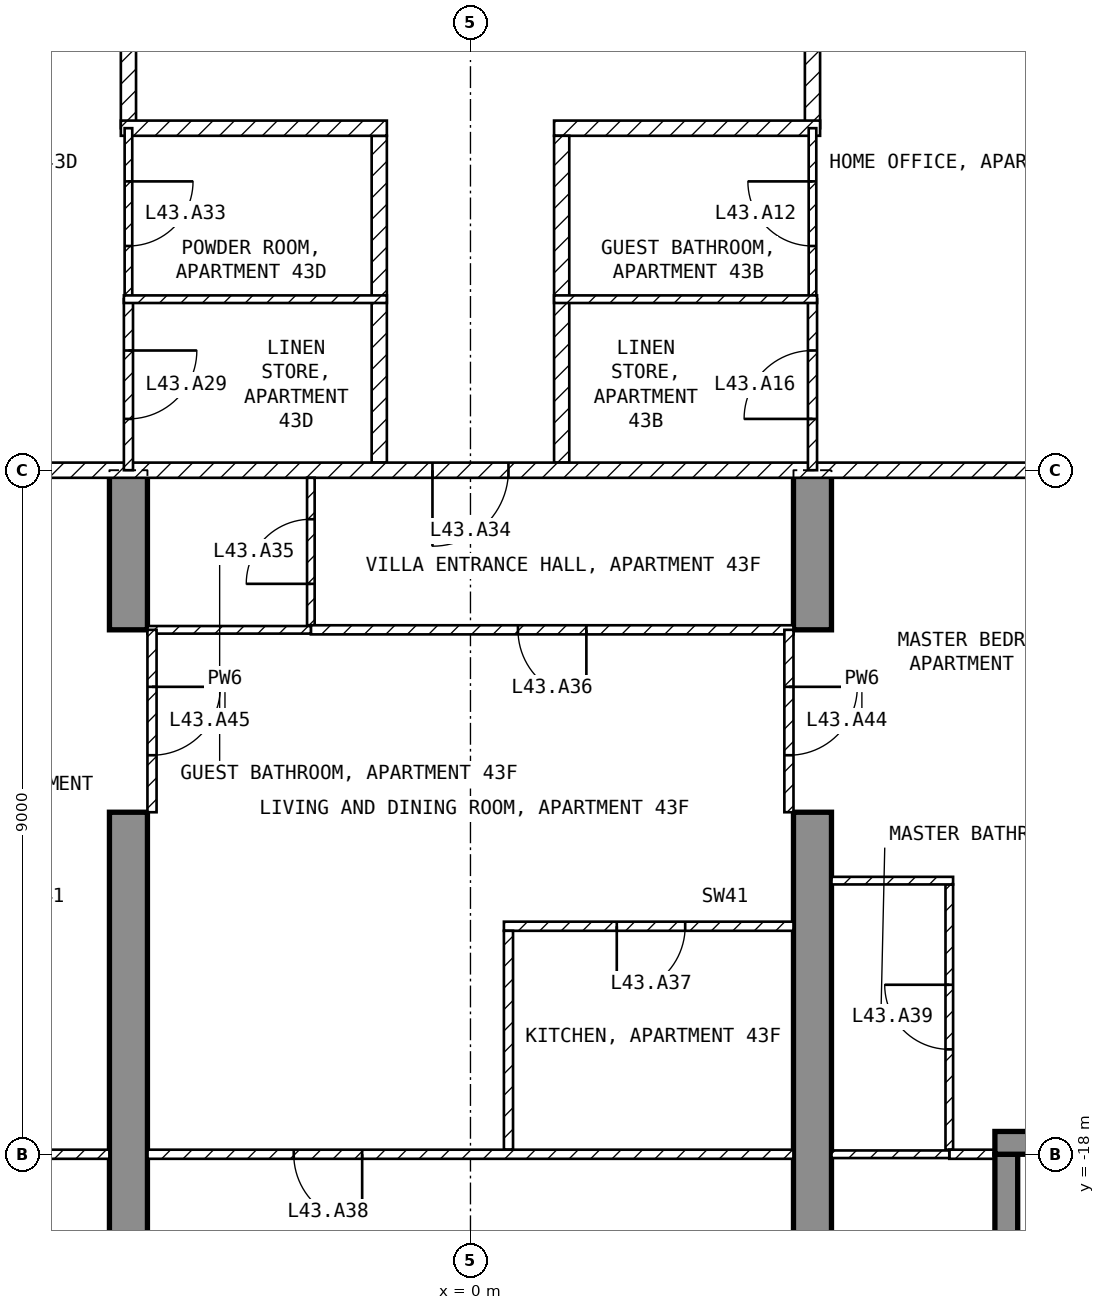
"""IFC4 building model, lengths in metres.
Left out: names, types, materials, properties, quantities, classifications, styles, units other than length and angle.
Written with IfcOpenShell. Run it as: python <this file> out.ifc"""

import sys

from ifc_helpers import new_model, si_unit, direction, frame, frame_2d, origin, place, context, subcontext, project, spatial, polyline, rectangle, outline, extrude, element, fill, save


model = new_model("IFC4")
c1 = context("Model", 3, precision=1e-05, world=origin(), true_north=direction((0.0, 1.0)))
c2 = subcontext(c1, "Body", "Model", "MODEL_VIEW")
j1 = project(units=[si_unit("LENGTHUNIT", "METRE"), si_unit("PLANEANGLEUNIT", "RADIAN")], contexts=[c1])
p1 = place(None, origin())
s1 = spatial("IfcSite", under=j1, at=p1, CompositionType="ELEMENT")
p2 = place(p1, origin())
s2 = spatial("IfcBuilding", under=s1, at=p2, CompositionType="ELEMENT")
p3 = place(p2, frame((0.0, 0.0, 177.1)))
s3 = spatial("IfcBuildingStorey", under=s2, at=p3, CompositionType="ELEMENT", Elevation=177.1)
for number, where, z_axis, x_axis in (
    (1, (-4.75, -20.225, -0.25), (1.0, 0.0, 0.0), (0.0, 1.0, 0.0)),
    (2, (4.25, -20.225, -0.25), (1.0, 0.0, 0.0), (0.0, 1.0, 0.0)),
):
    element("IfcWall", number, at=place(p3, frame(where, z_axis=z_axis, x_axis=x_axis)), inside=s3, PredefinedType="SHEAR", context=c2, shape_type="SweptSolid", body=[
        extrude(outline(polyline([(0.0, 0.0), (6.725, 0.0), (6.725, 2.65), (9.125, 2.65), (9.125, 0.0), (11.225, 0.0), (11.225, 3.5), (0.0, 3.5), (0.0, 0.0)])), origin(), (0.0, 0.0, 1.0), 0.5),
    ])
p4 = place(p3, frame((7.05, -19.8, 0.0), z_axis=(0.0, 0.0, 1.0), x_axis=(0.0, 1.0, 0.0)))
e3 = element("IfcWall", 3, at=p4, inside=s3, PredefinedType="SOLIDWALL", context=c2, shape_type="SweptSolid", body=[
    extrude(rectangle(XDim=1.8, YDim=0.3, at=frame_2d((0.9, 0.0))), origin(), (0.0, 0.0, 1.0), 3.25),
])
p5 = place(p3, frame((6.9, -17.85, 0.0), z_axis=(0.0, 0.0, 1.0), x_axis=(1.0, 0.0, 0.0)))
e4 = element("IfcWall", 4, at=p5, inside=s3, PredefinedType="SOLIDWALL", context=c2, shape_type="SweptSolid", body=[
    extrude(rectangle(XDim=1.85, YDim=0.3, at=frame_2d((0.925, 0.0))), origin(), (0.0, 0.0, 1.0), 3.25),
])
p6 = place(p3, frame((4.5, -1.3, 0.0), z_axis=(0.0, 0.0, 1.0), x_axis=(0.0, -1.0, 0.0)))
e5 = element("IfcWall", 5, at=p6, inside=s3, PredefinedType="PARTITIONING", context=c2, shape_type="SweptSolid", body=[
    extrude(rectangle(XDim=3.2, YDim=0.2, at=frame_2d((1.6, 0.0))), origin(), (0.0, 0.0, 1.0), 3.25),
])
p7 = place(p3, frame((4.6, -4.5, 0.0), z_axis=(0.0, 0.0, 1.0), x_axis=(-1.0, 0.0, 0.0)))
e6 = element("IfcWall", 6, at=p7, inside=s3, PredefinedType="PARTITIONING", context=c2, shape_type="SweptSolid", body=[
    extrude(rectangle(XDim=3.5, YDim=0.2, at=frame_2d((1.75, 0.0))), origin(), (0.0, 0.0, 1.0), 3.25),
])
p8 = place(p3, frame((1.2, -4.6, 0.0), z_axis=(0.0, 0.0, 1.0), x_axis=(0.0, -1.0, 0.0)))
e7 = element("IfcWall", 7, at=p8, inside=s3, PredefinedType="PARTITIONING", context=c2, shape_type="SweptSolid", body=[
    extrude(rectangle(XDim=4.3, YDim=0.2, at=frame_2d((2.15, 0.0))), origin(), (0.0, 0.0, 1.0), 3.25),
])
p9 = place(p3, frame((-4.5, -4.5, 0.0), z_axis=(0.0, 0.0, 1.0), x_axis=(0.0, 1.0, 0.0)))
e8 = element("IfcWall", 8, at=p9, inside=s3, PredefinedType="PARTITIONING", context=c2, shape_type="SweptSolid", body=[
    extrude(rectangle(XDim=3.2, YDim=0.2, at=frame_2d((1.6, 0.0))), origin(), (0.0, 0.0, 1.0), 3.25),
])
p10 = place(p3, frame((-1.2, -8.9, 0.0), z_axis=(0.0, 0.0, 1.0), x_axis=(0.0, 1.0, 0.0)))
e9 = element("IfcWall", 9, at=p10, inside=s3, PredefinedType="PARTITIONING", context=c2, shape_type="SweptSolid", body=[
    extrude(rectangle(XDim=4.3, YDim=0.2, at=frame_2d((2.15, 0.0))), origin(), (0.0, 0.0, 1.0), 3.25),
])
p11 = place(p3, frame((-1.1, -4.5, 0.0), z_axis=(0.0, 0.0, 1.0), x_axis=(-1.0, 0.0, 0.0)))
e10 = element("IfcWall", 10, at=p11, inside=s3, PredefinedType="PARTITIONING", context=c2, shape_type="SweptSolid", body=[
    extrude(rectangle(XDim=3.5, YDim=0.2, at=frame_2d((1.75, 0.0))), origin(), (0.0, 0.0, 1.0), 3.25),
])
p12 = place(p3, frame((8.92, -9.0, 0.0), z_axis=(0.0, 0.0, 1.0), x_axis=(-1.0, 0.0, 0.0)))
e11 = element("IfcWall", 11, at=p12, inside=s3, PredefinedType="PARTITIONING", context=c2, shape_type="SweptSolid", body=[
    extrude(rectangle(XDim=17.84, YDim=0.2, at=frame_2d((8.92, 0.0))), origin(), (0.0, 0.0, 1.0), 3.25),
])
p13 = place(p12, frame((8.42, 0.0, 0.0)))
e12 = element("IfcOpeningElement", 12, at=p13, cuts=e11, PredefinedType="OPENING", context=c2, shape_type="SweptSolid", body=[
    extrude(rectangle(XDim=1.0, YDim=2.1, at=frame_2d((0.5, 1.05))), frame((0.0, 0.11, 0.0), z_axis=(0.0, -1.0, 0.0), x_axis=(1.0, 0.0, 0.0)), (0.0, 0.0, 1.0), 0.22),
])
p14 = place(p3, frame((4.5, -6.75, 0.0), z_axis=(0.0, 0.0, 1.0), x_axis=(0.0, 1.0, 0.0)))
e13 = element("IfcWall", 13, at=p14, inside=s3, PredefinedType="PARTITIONING", context=c2, shape_type="SweptSolid", body=[
    extrude(rectangle(XDim=2.25, YDim=0.1, at=frame_2d((1.125, 0.0))), origin(), (0.0, 0.0, 1.0), 3.25),
])
p15 = place(p14, frame((0.7, 0.0, 0.0)))
e14 = element("IfcOpeningElement", 14, at=p15, cuts=e13, PredefinedType="OPENING", context=c2, shape_type="SweptSolid", body=[
    extrude(rectangle(XDim=0.85, YDim=2.1, at=frame_2d((0.425, 1.05))), frame((0.0, 0.06, 0.0), z_axis=(0.0, -1.0, 0.0), x_axis=(1.0, 0.0, 0.0)), (0.0, 0.0, 1.0), 0.12),
])
p16 = place(p3, frame((4.5, -9.0, 0.0), z_axis=(0.0, 0.0, 1.0), x_axis=(0.0, 1.0, 0.0)))
e15 = element("IfcWall", 15, at=p16, inside=s3, PredefinedType="PARTITIONING", context=c2, shape_type="SweptSolid", body=[
    extrude(rectangle(XDim=2.25, YDim=0.12, at=frame_2d((1.125, 0.0))), origin(), (0.0, 0.0, 1.0), 3.25),
])
p17 = place(p16, frame((0.675, 0.0, 0.0)))
e16 = element("IfcOpeningElement", 16, at=p17, cuts=e15, PredefinedType="OPENING", context=c2, shape_type="SweptSolid", body=[
    extrude(rectangle(XDim=0.9, YDim=2.1, at=frame_2d((0.45, 1.05))), frame((0.0, 0.07, 0.0), z_axis=(0.0, -1.0, 0.0), x_axis=(1.0, 0.0, 0.0)), (0.0, 0.0, 1.0), 0.14),
])
p18 = place(p3, frame((4.56, -6.75, 0.0), z_axis=(0.0, 0.0, 1.0), x_axis=(-1.0, 0.0, 0.0)))
e17 = element("IfcWall", 17, at=p18, inside=s3, PredefinedType="PARTITIONING", context=c2, shape_type="SweptSolid", body=[
    extrude(rectangle(XDim=3.46, YDim=0.1, at=frame_2d((1.73, 0.0))), origin(), (0.0, 0.0, 1.0), 3.25),
])
p19 = place(p3, frame((-4.5, -4.5, 0.0), z_axis=(0.0, 0.0, 1.0), x_axis=(0.0, -1.0, 0.0)))
e18 = element("IfcWall", 18, at=p19, inside=s3, PredefinedType="PARTITIONING", context=c2, shape_type="SweptSolid", body=[
    extrude(rectangle(XDim=2.25, YDim=0.1, at=frame_2d((1.125, 0.0))), origin(), (0.0, 0.0, 1.0), 3.25),
])
p20 = place(p19, frame((0.7, 0.0, 0.0)))
e19 = element("IfcOpeningElement", 19, at=p20, cuts=e18, PredefinedType="OPENING", context=c2, shape_type="SweptSolid", body=[
    extrude(rectangle(XDim=0.85, YDim=2.1, at=frame_2d((0.425, 1.05))), frame((0.0, 0.06, 0.0), z_axis=(0.0, -1.0, 0.0), x_axis=(1.0, 0.0, 0.0)), (0.0, 0.0, 1.0), 0.12),
])
p21 = place(p3, frame((-4.5, -6.75, 0.0), z_axis=(0.0, 0.0, 1.0), x_axis=(0.0, -1.0, 0.0)))
e20 = element("IfcWall", 20, at=p21, inside=s3, PredefinedType="PARTITIONING", context=c2, shape_type="SweptSolid", body=[
    extrude(rectangle(XDim=2.25, YDim=0.12, at=frame_2d((1.125, 0.0))), origin(), (0.0, 0.0, 1.0), 3.25),
])
p22 = place(p21, frame((0.675, 0.0, 0.0)))
e21 = element("IfcOpeningElement", 21, at=p22, cuts=e20, PredefinedType="OPENING", context=c2, shape_type="SweptSolid", body=[
    extrude(rectangle(XDim=0.9, YDim=2.1, at=frame_2d((0.45, 1.05))), frame((0.0, 0.07, 0.0), z_axis=(0.0, -1.0, 0.0), x_axis=(1.0, 0.0, 0.0)), (0.0, 0.0, 1.0), 0.14),
])
p23 = place(p3, frame((-1.1, -6.75, 0.0), z_axis=(0.0, 0.0, 1.0), x_axis=(-1.0, 0.0, 0.0)))
e22 = element("IfcWall", 22, at=p23, inside=s3, PredefinedType="PARTITIONING", context=c2, shape_type="SweptSolid", body=[
    extrude(rectangle(XDim=3.46, YDim=0.1, at=frame_2d((1.73, 0.0))), origin(), (0.0, 0.0, 1.0), 3.25),
])
p24 = place(p3, frame((-2.1, -11.04, 0.0), z_axis=(0.0, 0.0, 1.0), x_axis=(0.0, 1.0, 0.0)))
e23 = element("IfcWall", 23, at=p24, inside=s3, PredefinedType="PARTITIONING", context=c2, shape_type="SweptSolid", body=[
    extrude(rectangle(XDim=1.94, YDim=0.1, at=frame_2d((0.97, 0.0))), origin(), (0.0, 0.0, 1.0), 3.25),
])
p25 = place(p24, frame((0.545, 0.0, 0.0)))
e24 = element("IfcOpeningElement", 24, at=p25, cuts=e23, PredefinedType="OPENING", context=c2, shape_type="SweptSolid", body=[
    extrude(rectangle(XDim=0.85, YDim=2.1, at=frame_2d((0.425, 1.05))), frame((0.0, 0.06, 0.0), z_axis=(0.0, -1.0, 0.0), x_axis=(1.0, 0.0, 0.0)), (0.0, 0.0, 1.0), 0.12),
])
p26 = place(p3, frame((4.25, -11.1, 0.0), z_axis=(0.0, 0.0, 1.0), x_axis=(-1.0, 0.0, 0.0)))
e25 = element("IfcWall", 25, at=p26, inside=s3, PredefinedType="PARTITIONING", context=c2, shape_type="SweptSolid", body=[
    extrude(rectangle(XDim=6.35, YDim=0.12, at=frame_2d((3.175, 0.0))), origin(), (0.0, 0.0, 1.0), 3.25),
])
p27 = place(p26, frame((2.725, 0.0, 0.0)))
e26 = element("IfcOpeningElement", 26, at=p27, cuts=e25, PredefinedType="OPENING", context=c2, shape_type="SweptSolid", body=[
    extrude(rectangle(XDim=0.9, YDim=2.1, at=frame_2d((0.45, 1.05))), frame((0.0, 0.07, 0.0), z_axis=(0.0, -1.0, 0.0), x_axis=(1.0, 0.0, 0.0)), (0.0, 0.0, 1.0), 0.14),
])
p28 = place(p3, frame((-2.1, -11.1, 0.0), z_axis=(0.0, 0.0, 1.0), x_axis=(-1.0, 0.0, 0.0)))
e27 = element("IfcWall", 27, at=p28, inside=s3, PredefinedType="PARTITIONING", context=c2, shape_type="SweptSolid", body=[
    extrude(rectangle(XDim=2.15, YDim=0.1, at=frame_2d((1.075, 0.0))), origin(), (0.0, 0.0, 1.0), 3.25),
])
p29 = place(p3, frame((4.25, -15.0, 0.0), z_axis=(0.0, 0.0, 1.0), x_axis=(-1.0, 0.0, 0.0)))
e28 = element("IfcWall", 28, at=p29, inside=s3, PredefinedType="PARTITIONING", context=c2, shape_type="SweptSolid", body=[
    extrude(rectangle(XDim=3.81, YDim=0.12, at=frame_2d((1.905, 0.0))), origin(), (0.0, 0.0, 1.0), 3.25),
])
p30 = place(p29, frame((1.425, 0.0, 0.0)))
e29 = element("IfcOpeningElement", 29, at=p30, cuts=e28, PredefinedType="OPENING", context=c2, shape_type="SweptSolid", body=[
    extrude(rectangle(XDim=0.9, YDim=2.1, at=frame_2d((0.45, 1.05))), frame((0.0, 0.07, 0.0), z_axis=(0.0, -1.0, 0.0), x_axis=(1.0, 0.0, 0.0)), (0.0, 0.0, 1.0), 0.14),
])
p31 = place(p3, frame((0.5, -15.06, 0.0), z_axis=(0.0, 0.0, 1.0), x_axis=(0.0, -1.0, 0.0)))
e30 = element("IfcWall", 30, at=p31, inside=s3, PredefinedType="PARTITIONING", context=c2, shape_type="SweptSolid", body=[
    extrude(rectangle(XDim=2.88, YDim=0.12, at=frame_2d((1.44, 0.0))), origin(), (0.0, 0.0, 1.0), 3.25),
])
p32 = place(p3, frame((4.25, -18.0, 0.0), z_axis=(0.0, 0.0, 1.0), x_axis=(-1.0, 0.0, 0.0)))
e31 = element("IfcWall", 31, at=p32, inside=s3, PredefinedType="PARTITIONING", context=c2, shape_type="SweptSolid", body=[
    extrude(rectangle(XDim=8.5, YDim=0.12, at=frame_2d((4.25, 0.0))), origin(), (0.0, 0.0, 1.0), 3.25),
])
p33 = place(p32, frame((5.675, 0.0, 0.0)))
e32 = element("IfcOpeningElement", 32, at=p33, cuts=e31, PredefinedType="OPENING", context=c2, shape_type="SweptSolid", body=[
    extrude(rectangle(XDim=0.9, YDim=2.1, at=frame_2d((0.45, 1.05))), frame((0.0, 0.07, 0.0), z_axis=(0.0, -1.0, 0.0), x_axis=(1.0, 0.0, 0.0)), (0.0, 0.0, 1.0), 0.14),
])
p34 = place(p3, frame((6.3, -17.94, 0.0), z_axis=(0.0, 0.0, 1.0), x_axis=(0.0, 1.0, 0.0)))
e33 = element("IfcWall", 33, at=p34, inside=s3, PredefinedType="PARTITIONING", context=c2, shape_type="SweptSolid", body=[
    extrude(rectangle(XDim=3.49, YDim=0.1, at=frame_2d((1.745, 0.0))), origin(), (0.0, 0.0, 1.0), 3.25),
])
p35 = place(p34, frame((1.32, 0.0, 0.0)))
e34 = element("IfcOpeningElement", 34, at=p35, cuts=e33, PredefinedType="OPENING", context=c2, shape_type="SweptSolid", body=[
    extrude(rectangle(XDim=0.85, YDim=2.1, at=frame_2d((0.425, 1.05))), frame((0.0, 0.06, 0.0), z_axis=(0.0, -1.0, 0.0), x_axis=(1.0, 0.0, 0.0)), (0.0, 0.0, 1.0), 0.12),
])
p36 = place(p3, frame((6.35, -14.4, 0.0), z_axis=(0.0, 0.0, 1.0), x_axis=(-1.0, 0.0, 0.0)))
e35 = element("IfcWall", 35, at=p36, inside=s3, PredefinedType="PARTITIONING", context=c2, shape_type="SweptSolid", body=[
    extrude(rectangle(XDim=1.6, YDim=0.1, at=frame_2d((0.8, 0.0))), origin(), (0.0, 0.0, 1.0), 3.25),
])
p37 = place(p3, frame((7.12, -18.0, 0.0), z_axis=(0.0, 0.0, 1.0), x_axis=(-1.0, 0.0, 0.0)))
e36 = element("IfcWall", 36, at=p37, inside=s3, PredefinedType="PARTITIONING", context=c2, shape_type="SweptSolid", body=[
    extrude(rectangle(XDim=0.82, YDim=0.12, at=frame_2d((0.41, 0.0))), origin(), (0.0, 0.0, 1.0), 3.25),
])
p38 = place(p3, frame((6.3, -18.0, 0.0), z_axis=(0.0, 0.0, 1.0), x_axis=(-1.0, 0.0, 0.0)))
e37 = element("IfcWall", 37, at=p38, inside=s3, PredefinedType="PARTITIONING", context=c2, shape_type="SweptSolid", body=[
    extrude(rectangle(XDim=1.55, YDim=0.1, at=frame_2d((0.775, 0.0))), origin(), (0.0, 0.0, 1.0), 3.25),
])
p39 = place(p3, frame((-4.75, -18.0, 0.0), z_axis=(0.0, 0.0, 1.0), x_axis=(-1.0, 0.0, 0.0)))
e38 = element("IfcWall", 38, at=p39, inside=s3, PredefinedType="PARTITIONING", context=c2, shape_type="SweptSolid", body=[
    extrude(rectangle(XDim=2.37, YDim=0.12, at=frame_2d((1.185, 0.0))), origin(), (0.0, 0.0, 1.0), 3.25),
])
p40 = place(p3, frame((4.19, -11.1, 0.0), z_axis=(0.0, 0.0, 1.0), x_axis=(0.0, -1.0, 0.0)))
e39 = element("IfcWall", 39, at=p40, inside=s3, PredefinedType="PARTITIONING", context=c2, shape_type="SweptSolid", body=[
    extrude(rectangle(XDim=2.4, YDim=0.12, at=frame_2d((1.2, 0.0))), origin(), (0.0, 0.0, 1.0), 2.4),
])
p41 = place(p40, frame((0.75, 0.0, 0.0)))
e40 = element("IfcOpeningElement", 40, at=p41, cuts=e39, PredefinedType="OPENING", context=c2, shape_type="SweptSolid", body=[
    extrude(rectangle(XDim=0.9, YDim=2.1, at=frame_2d((0.45, 1.05))), frame((0.0, 0.07, 0.0), z_axis=(0.0, -1.0, 0.0), x_axis=(1.0, 0.0, 0.0)), (0.0, 0.0, 1.0), 0.14),
])
p42 = place(p3, frame((-4.19, -11.1, 0.0), z_axis=(0.0, 0.0, 1.0), x_axis=(0.0, -1.0, 0.0)))
e41 = element("IfcWall", 41, at=p42, inside=s3, PredefinedType="PARTITIONING", context=c2, shape_type="SweptSolid", body=[
    extrude(rectangle(XDim=2.4, YDim=0.12, at=frame_2d((1.2, 0.0))), origin(), (0.0, 0.0, 1.0), 2.4),
])
p43 = place(p42, frame((0.75, 0.0, 0.0)))
e42 = element("IfcOpeningElement", 42, at=p43, cuts=e41, PredefinedType="OPENING", context=c2, shape_type="SweptSolid", body=[
    extrude(rectangle(XDim=0.9, YDim=2.1, at=frame_2d((0.45, 1.05))), frame((0.0, 0.07, 0.0), z_axis=(0.0, -1.0, 0.0), x_axis=(1.0, 0.0, 0.0)), (0.0, 0.0, 1.0), 0.14),
])
p44 = place(p15, origin())
e43 = element("IfcDoor", 43, at=p44, inside=s3, OperationType="SINGLE_SWING_RIGHT", PredefinedType="DOOR", context=c2, shape_type="SweptSolid", body=[
    extrude(rectangle(XDim=0.85, YDim=2.1, at=frame_2d((0.425, 1.05))), frame((0.0, 0.025, 0.0), z_axis=(0.0, -1.0, 0.0), x_axis=(1.0, 0.0, 0.0)), (0.0, 0.0, 1.0), 0.05),
])
fill(e14, e43)
p45 = place(p17, origin())
e44 = element("IfcDoor", 44, at=p45, inside=s3, OperationType="SINGLE_SWING_LEFT", PredefinedType="DOOR", context=c2, shape_type="SweptSolid", body=[
    extrude(rectangle(XDim=0.9, YDim=2.1, at=frame_2d((0.45, 1.05))), frame((0.0, 0.025, 0.0), z_axis=(0.0, -1.0, 0.0), x_axis=(1.0, 0.0, 0.0)), (0.0, 0.0, 1.0), 0.05),
])
fill(e16, e44)
p46 = place(p22, origin())
e45 = element("IfcDoor", 45, at=p46, inside=s3, OperationType="SINGLE_SWING_LEFT", PredefinedType="DOOR", context=c2, shape_type="SweptSolid", body=[
    extrude(rectangle(XDim=0.9, YDim=2.1, at=frame_2d((0.45, 1.05))), frame((0.0, 0.025, 0.0), z_axis=(0.0, -1.0, 0.0), x_axis=(1.0, 0.0, 0.0)), (0.0, 0.0, 1.0), 0.05),
])
fill(e21, e45)
p47 = place(p20, origin())
e46 = element("IfcDoor", 46, at=p47, inside=s3, OperationType="SINGLE_SWING_LEFT", PredefinedType="DOOR", context=c2, shape_type="SweptSolid", body=[
    extrude(rectangle(XDim=0.85, YDim=2.1, at=frame_2d((0.425, 1.05))), frame((0.0, 0.025, 0.0), z_axis=(0.0, -1.0, 0.0), x_axis=(1.0, 0.0, 0.0)), (0.0, 0.0, 1.0), 0.05),
])
fill(e19, e46)
p48 = place(p13, origin())
e47 = element("IfcDoor", 47, at=p48, inside=s3, OperationType="SINGLE_SWING_RIGHT", PredefinedType="DOOR", context=c2, shape_type="SweptSolid", body=[
    extrude(rectangle(XDim=1.0, YDim=2.1, at=frame_2d((0.5, 1.05))), frame((0.0, 0.025, 0.0), z_axis=(0.0, -1.0, 0.0), x_axis=(1.0, 0.0, 0.0)), (0.0, 0.0, 1.0), 0.05),
])
fill(e12, e47)
p49 = place(p25, origin())
e48 = element("IfcDoor", 48, at=p49, inside=s3, OperationType="SINGLE_SWING_LEFT", PredefinedType="DOOR", context=c2, shape_type="SweptSolid", body=[
    extrude(rectangle(XDim=0.85, YDim=2.1, at=frame_2d((0.425, 1.05))), frame((0.0, 0.025, 0.0), z_axis=(0.0, -1.0, 0.0), x_axis=(1.0, 0.0, 0.0)), (0.0, 0.0, 1.0), 0.05),
])
fill(e24, e48)
p50 = place(p27, origin())
e49 = element("IfcDoor", 49, at=p50, inside=s3, OperationType="SINGLE_SWING_LEFT", PredefinedType="DOOR", context=c2, shape_type="SweptSolid", body=[
    extrude(rectangle(XDim=0.9, YDim=2.1, at=frame_2d((0.45, 1.05))), frame((0.0, 0.025, 0.0), z_axis=(0.0, -1.0, 0.0), x_axis=(1.0, 0.0, 0.0)), (0.0, 0.0, 1.0), 0.05),
])
fill(e26, e49)
p51 = place(p30, origin())
e50 = element("IfcDoor", 50, at=p51, inside=s3, OperationType="SINGLE_SWING_RIGHT", PredefinedType="DOOR", context=c2, shape_type="SweptSolid", body=[
    extrude(rectangle(XDim=0.9, YDim=2.1, at=frame_2d((0.45, 1.05))), frame((0.0, 0.025, 0.0), z_axis=(0.0, -1.0, 0.0), x_axis=(1.0, 0.0, 0.0)), (0.0, 0.0, 1.0), 0.05),
])
fill(e29, e50)
p52 = place(p33, origin())
e51 = element("IfcDoor", 51, at=p52, inside=s3, OperationType="SINGLE_SWING_LEFT", PredefinedType="DOOR", context=c2, shape_type="SweptSolid", body=[
    extrude(rectangle(XDim=0.9, YDim=2.1, at=frame_2d((0.45, 1.05))), frame((0.0, 0.025, 0.0), z_axis=(0.0, -1.0, 0.0), x_axis=(1.0, 0.0, 0.0)), (0.0, 0.0, 1.0), 0.05),
])
fill(e32, e51)
p53 = place(p35, origin())
e52 = element("IfcDoor", 52, at=p53, inside=s3, OperationType="SINGLE_SWING_RIGHT", PredefinedType="DOOR", context=c2, shape_type="SweptSolid", body=[
    extrude(rectangle(XDim=0.85, YDim=2.1, at=frame_2d((0.425, 1.05))), frame((0.0, 0.025, 0.0), z_axis=(0.0, -1.0, 0.0), x_axis=(1.0, 0.0, 0.0)), (0.0, 0.0, 1.0), 0.05),
])
fill(e34, e52)
p54 = place(p41, origin())
e53 = element("IfcDoor", 53, at=p54, inside=s3, OperationType="SINGLE_SWING_LEFT", PredefinedType="DOOR", context=c2, shape_type="SweptSolid", body=[
    extrude(rectangle(XDim=0.9, YDim=2.1, at=frame_2d((0.45, 1.05))), frame((0.0, 0.025, 0.0), z_axis=(0.0, -1.0, 0.0), x_axis=(1.0, 0.0, 0.0)), (0.0, 0.0, 1.0), 0.05),
])
fill(e40, e53)
p55 = place(p43, origin())
e54 = element("IfcDoor", 54, at=p55, inside=s3, OperationType="SINGLE_SWING_LEFT", PredefinedType="DOOR", context=c2, shape_type="SweptSolid", body=[
    extrude(rectangle(XDim=0.9, YDim=2.1, at=frame_2d((0.45, 1.05))), frame((0.0, 0.025, 0.0), z_axis=(0.0, -1.0, 0.0), x_axis=(1.0, 0.0, 0.0)), (0.0, 0.0, 1.0), 0.05),
])
fill(e42, e54)
save(model, sys.argv[1])
